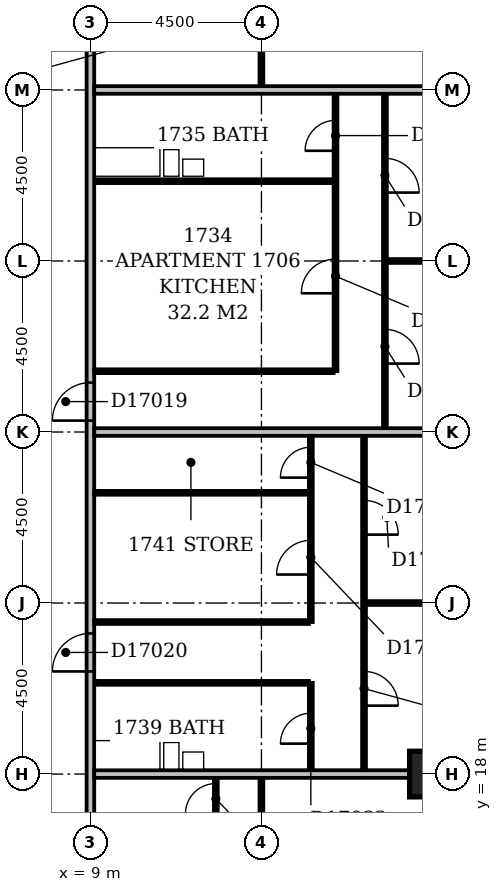
"""IFC4 building model, lengths in metres.
Left out: names, types, materials, properties, quantities, classifications, styles, units other than length and angle.
Written with IfcOpenShell. Run it as: python <this file> out.ifc"""

import sys

from ifc_helpers import new_model, si_unit, direction, frame, frame_2d, origin, origin_2d, place, context, subcontext, project, spatial, rectangle, extrude, element, fill, save


model = new_model("IFC4")
c1 = context("Model", 3, precision=1e-05, world=origin(), true_north=direction((0.0, 1.0)))
c2 = subcontext(c1, "Body", "Model", "MODEL_VIEW")
j1 = project(units=[si_unit("LENGTHUNIT", "METRE"), si_unit("PLANEANGLEUNIT", "RADIAN")], contexts=[c1])
p1 = place(None, origin())
s1 = spatial("IfcSite", under=j1, at=p1, CompositionType="ELEMENT")
p2 = place(p1, origin())
s2 = spatial("IfcBuilding", under=s1, at=p2, CompositionType="ELEMENT")
p3 = place(p2, frame((0.0, 0.0, 72.2)))
s3 = spatial("IfcBuildingStorey", under=s2, at=p3, CompositionType="ELEMENT", Elevation=72.2)
p4 = place(p3, frame((18.0, 18.0, -0.3), z_axis=(0.0, 0.0, 1.0), x_axis=(1.0, 0.0, 0.0)))
e1 = element("IfcColumn", 1, at=p4, inside=s3, PredefinedType="COLUMN", context=c2, shape_type="SweptSolid", body=[
    extrude(rectangle(XDim=1.2, YDim=1.2, at=origin_2d()), origin(), (0.0, 0.0, 1.0), 3.6),
])
p5 = place(p3, frame((9.0, 5.0, 0.0), z_axis=(0.0, 0.0, 1.0), x_axis=(0.0, 1.0, 0.0)))
e2 = element("IfcWall", 2, at=p5, inside=s3, PredefinedType="PARTITIONING", context=c2, shape_type="SweptSolid", body=[
    extrude(rectangle(XDim=44.5, YDim=0.2, at=frame_2d((22.25, 0.0))), origin(), (0.0, 0.0, 1.0), 3.3),
])
p6 = place(p5, frame((22.3, 0.0, 0.0)))
e3 = element("IfcOpeningElement", 3, at=p6, cuts=e2, PredefinedType="OPENING", context=c2, shape_type="SweptSolid", body=[
    extrude(rectangle(XDim=1.0, YDim=2.1, at=frame_2d((0.5, 1.05))), frame((0.0, 0.112, 0.0), z_axis=(0.0, -1.0, 0.0), x_axis=(1.0, 0.0, 0.0)), (0.0, 0.0, 1.0), 0.224),
])
p7 = place(p5, frame((15.7, 0.0, 0.0)))
e4 = element("IfcOpeningElement", 4, at=p7, cuts=e2, PredefinedType="OPENING", context=c2, shape_type="SweptSolid", body=[
    extrude(rectangle(XDim=1.0, YDim=2.1, at=frame_2d((0.5, 1.05))), frame((0.0, 0.112, 0.0), z_axis=(0.0, -1.0, 0.0), x_axis=(1.0, 0.0, 0.0)), (0.0, 0.0, 1.0), 0.224),
])
p8 = place(p5, frame((10.45, 0.0, 0.0)))
e5 = element("IfcOpeningElement", 5, at=p8, cuts=e2, PredefinedType="OPENING", context=c2, shape_type="SweptSolid", body=[
    extrude(rectangle(XDim=1.0, YDim=2.1, at=frame_2d((0.5, 1.05))), frame((0.0, 0.112, 0.0), z_axis=(0.0, -1.0, 0.0), x_axis=(1.0, 0.0, 0.0)), (0.0, 0.0, 1.0), 0.224),
])
p9 = place(p5, frame((5.95, 0.0, 0.0)))
e6 = element("IfcOpeningElement", 6, at=p9, cuts=e2, PredefinedType="OPENING", context=c2, shape_type="SweptSolid", body=[
    extrude(rectangle(XDim=1.0, YDim=2.1, at=frame_2d((0.5, 1.05))), frame((0.0, 0.112, 0.0), z_axis=(0.0, -1.0, 0.0), x_axis=(1.0, 0.0, 0.0)), (0.0, 0.0, 1.0), 0.224),
])
p10 = place(p5, frame((37.25, 0.0, 0.0)))
e7 = element("IfcOpeningElement", 7, at=p10, cuts=e2, PredefinedType="OPENING", context=c2, shape_type="SweptSolid", body=[
    extrude(rectangle(XDim=0.9, YDim=2.1, at=frame_2d((0.45, 1.05))), frame((0.0, 0.112, 0.0), z_axis=(0.0, -1.0, 0.0), x_axis=(1.0, 0.0, 0.0)), (0.0, 0.0, 1.0), 0.224),
])
p11 = place(p5, frame((1.5, 0.0, 0.0)))
e8 = element("IfcOpeningElement", 8, at=p11, cuts=e2, PredefinedType="OPENING", context=c2, shape_type="SweptSolid", body=[
    extrude(rectangle(XDim=0.9, YDim=2.1, at=frame_2d((0.45, 1.05))), frame((0.0, 0.112, 0.0), z_axis=(0.0, -1.0, 0.0), x_axis=(1.0, 0.0, 0.0)), (0.0, 0.0, 1.0), 0.224),
])
p12 = place(p3, frame((13.5, 9.6, 0.0), z_axis=(0.0, 0.0, 1.0), x_axis=(0.0, 1.0, 0.0)))
e9 = element("IfcWall", 9, at=p12, inside=s3, PredefinedType="PARTITIONING", context=c2, shape_type="SweptSolid", body=[
    extrude(rectangle(XDim=8.3, YDim=0.1, at=frame_2d((4.15, 0.0))), origin(), (0.0, 0.0, 1.0), 3.3),
])
p13 = place(p12, frame((5.7, 0.0, 0.0)))
e10 = element("IfcOpeningElement", 10, at=p13, cuts=e9, PredefinedType="OPENING", context=c2, shape_type="SweptSolid", body=[
    extrude(rectangle(XDim=0.9, YDim=2.1, at=frame_2d((0.45, 1.05))), frame((0.0, 0.062, 0.0), z_axis=(0.0, -1.0, 0.0), x_axis=(1.0, 0.0, 0.0)), (0.0, 0.0, 1.0), 0.124),
])
p14 = place(p12, frame((1.2, 0.0, 0.0)))
e11 = element("IfcOpeningElement", 11, at=p14, cuts=e9, PredefinedType="OPENING", context=c2, shape_type="SweptSolid", body=[
    extrude(rectangle(XDim=0.9, YDim=2.1, at=frame_2d((0.45, 1.05))), frame((0.0, 0.062, 0.0), z_axis=(0.0, -1.0, 0.0), x_axis=(1.0, 0.0, 0.0)), (0.0, 0.0, 1.0), 0.124),
])
p15 = place(p3, frame((12.3, 16.7, 0.0), z_axis=(0.0, 0.0, 1.0), x_axis=(0.0, 1.0, 0.0)))
e12 = element("IfcWall", 12, at=p15, inside=s3, PredefinedType="PARTITIONING", context=c2, shape_type="SweptSolid", body=[
    extrude(rectangle(XDim=1.2, YDim=0.1, at=frame_2d((0.6, 0.0))), origin(), (0.0, 0.0, 1.0), 3.3),
])
p16 = place(p15, frame((0.25, 0.0, 0.0)))
e13 = element("IfcOpeningElement", 13, at=p16, cuts=e12, PredefinedType="OPENING", context=c2, shape_type="SweptSolid", body=[
    extrude(rectangle(XDim=0.8, YDim=2.1, at=frame_2d((0.4, 1.05))), frame((0.0, 0.062, 0.0), z_axis=(0.0, -1.0, 0.0), x_axis=(1.0, 0.0, 0.0)), (0.0, 0.0, 1.0), 0.124),
])
p17 = place(p3, frame((9.1, 18.0, 0.0), z_axis=(0.0, 0.0, 1.0), x_axis=(1.0, 0.0, 0.0)))
e14 = element("IfcWall", 14, at=p17, inside=s3, PredefinedType="PARTITIONING", context=c2, shape_type="SweptSolid", body=[
    extrude(rectangle(XDim=8.3, YDim=0.2, at=frame_2d((4.15, 0.0))), origin(), (0.0, 0.0, 1.0), 2.6),
])
p18 = place(p3, frame((14.8, 18.1, 0.0), z_axis=(0.0, 0.0, 1.0), x_axis=(0.0, 1.0, 0.0)))
e15 = element("IfcWall", 15, at=p18, inside=s3, PredefinedType="PARTITIONING", context=c2, shape_type="SweptSolid", body=[
    extrude(rectangle(XDim=2.3, YDim=0.1, at=frame_2d((1.15, 0.0))), origin(), (0.0, 0.0, 1.0), 3.3),
])
p19 = place(p18, frame((0.7, 0.0, 0.0)))
e16 = element("IfcOpeningElement", 16, at=p19, cuts=e15, PredefinedType="OPENING", context=c2, shape_type="SweptSolid", body=[
    extrude(rectangle(XDim=0.8, YDim=2.1, at=frame_2d((0.4, 1.05))), frame((0.0, 0.062, 0.0), z_axis=(0.0, -1.0, 0.0), x_axis=(1.0, 0.0, 0.0)), (0.0, 0.0, 1.0), 0.124),
])
p20 = place(p3, frame((16.2, 18.1, 0.0), z_axis=(0.0, 0.0, 1.0), x_axis=(0.0, 1.0, 0.0)))
e17 = element("IfcWall", 17, at=p20, inside=s3, PredefinedType="PARTITIONING", context=c2, shape_type="SweptSolid", body=[
    extrude(rectangle(XDim=8.8, YDim=0.1, at=frame_2d((4.4, 0.0))), origin(), (0.0, 0.0, 1.0), 3.3),
])
p21 = place(p20, frame((1.7, 0.0, 0.0)))
e18 = element("IfcOpeningElement", 18, at=p21, cuts=e17, PredefinedType="OPENING", context=c2, shape_type="SweptSolid", body=[
    extrude(rectangle(XDim=0.9, YDim=2.1, at=frame_2d((0.45, 1.05))), frame((0.0, 0.062, 0.0), z_axis=(0.0, -1.0, 0.0), x_axis=(1.0, 0.0, 0.0)), (0.0, 0.0, 1.0), 0.124),
])
p22 = place(p20, frame((6.2, 0.0, 0.0)))
e19 = element("IfcOpeningElement", 19, at=p22, cuts=e17, PredefinedType="OPENING", context=c2, shape_type="SweptSolid", body=[
    extrude(rectangle(XDim=0.9, YDim=2.1, at=frame_2d((0.45, 1.05))), frame((0.0, 0.062, 0.0), z_axis=(0.0, -1.0, 0.0), x_axis=(1.0, 0.0, 0.0)), (0.0, 0.0, 1.0), 0.124),
])
p23 = place(p3, frame((9.1, 20.4, 0.0), z_axis=(0.0, 0.0, 1.0), x_axis=(1.0, 0.0, 0.0)))
e20 = element("IfcWall", 20, at=p23, inside=s3, PredefinedType="PLUMBINGWALL", context=c2, shape_type="SweptSolid", body=[
    extrude(rectangle(XDim=5.65, YDim=0.1, at=frame_2d((2.825, 0.0))), origin(), (0.0, 0.0, 1.0), 3.3),
])
p24 = place(p3, frame((9.1, 22.0, 0.0), z_axis=(0.0, 0.0, 1.0), x_axis=(1.0, 0.0, 0.0)))
e21 = element("IfcWall", 21, at=p24, inside=s3, PredefinedType="PARTITIONING", context=c2, shape_type="SweptSolid", body=[
    extrude(rectangle(XDim=5.65, YDim=0.1, at=frame_2d((2.825, 0.0))), origin(), (0.0, 0.0, 1.0), 3.3),
])
p25 = place(p3, frame((14.8, 22.0, 0.0), z_axis=(0.0, 0.0, 1.0), x_axis=(0.0, 1.0, 0.0)))
e22 = element("IfcWall", 22, at=p25, inside=s3, PredefinedType="PARTITIONING", context=c2, shape_type="SweptSolid", body=[
    extrude(rectangle(XDim=4.9, YDim=0.1, at=frame_2d((2.45, 0.0))), origin(), (0.0, 0.0, 1.0), 3.3),
])
p26 = place(p25, frame((1.25, 0.0, 0.0)))
e23 = element("IfcOpeningElement", 23, at=p26, cuts=e22, PredefinedType="OPENING", context=c2, shape_type="SweptSolid", body=[
    extrude(rectangle(XDim=0.9, YDim=2.1, at=frame_2d((0.45, 1.05))), frame((0.0, 0.062, 0.0), z_axis=(0.0, -1.0, 0.0), x_axis=(1.0, 0.0, 0.0)), (0.0, 0.0, 1.0), 0.124),
])
p27 = place(p25, frame((3.8, 0.0, 0.0)))
e24 = element("IfcOpeningElement", 24, at=p27, cuts=e22, PredefinedType="OPENING", context=c2, shape_type="SweptSolid", body=[
    extrude(rectangle(XDim=0.8, YDim=2.1, at=frame_2d((0.4, 1.05))), frame((0.0, 0.062, 0.0), z_axis=(0.0, -1.0, 0.0), x_axis=(1.0, 0.0, 0.0)), (0.0, 0.0, 1.0), 0.124),
])
for number, where, z_axis, x_axis in (
    (25, (16.25, 22.5, 0.0), (0.0, 0.0, 1.0), (1.0, 0.0, 0.0)),
    (26, (9.1, 25.4, 0.0), (0.0, 0.0, 1.0), (1.0, 0.0, 0.0)),
):
    element("IfcWall", number, at=place(p3, frame(where, z_axis=z_axis, x_axis=x_axis)), inside=s3, PredefinedType="PARTITIONING", context=c2, shape_type="SweptSolid", body=[
        extrude(rectangle(XDim=5.65, YDim=0.1, at=frame_2d((2.825, 0.0))), origin(), (0.0, 0.0, 1.0), 3.3),
    ])
p28 = place(p3, frame((9.1, 27.0, 0.0), z_axis=(0.0, 0.0, 1.0), x_axis=(1.0, 0.0, 0.0)))
e27 = element("IfcWall", 27, at=p28, inside=s3, PredefinedType="PARTITIONING", context=c2, shape_type="SweptSolid", body=[
    extrude(rectangle(XDim=12.8, YDim=0.2, at=frame_2d((6.4, 0.0))), origin(), (0.0, 0.0, 1.0), 2.7),
])
p29 = place(p3, frame((16.75, 27.1, 0.0), z_axis=(0.0, 0.0, 1.0), x_axis=(0.0, 1.0, 0.0)))
e28 = element("IfcWall", 28, at=p29, inside=s3, PredefinedType="PARTITIONING", context=c2, shape_type="SweptSolid", body=[
    extrude(rectangle(XDim=8.8, YDim=0.1, at=frame_2d((4.4, 0.0))), origin(), (0.0, 0.0, 1.0), 3.3),
])
p30 = place(p29, frame((1.7, 0.0, 0.0)))
e29 = element("IfcOpeningElement", 29, at=p30, cuts=e28, PredefinedType="OPENING", context=c2, shape_type="SweptSolid", body=[
    extrude(rectangle(XDim=0.9, YDim=2.1, at=frame_2d((0.45, 1.05))), frame((0.0, 0.062, 0.0), z_axis=(0.0, -1.0, 0.0), x_axis=(1.0, 0.0, 0.0)), (0.0, 0.0, 1.0), 0.124),
])
p31 = place(p29, frame((6.2, 0.0, 0.0)))
e30 = element("IfcOpeningElement", 30, at=p31, cuts=e28, PredefinedType="OPENING", context=c2, shape_type="SweptSolid", body=[
    extrude(rectangle(XDim=0.9, YDim=2.1, at=frame_2d((0.45, 1.05))), frame((0.0, 0.062, 0.0), z_axis=(0.0, -1.0, 0.0), x_axis=(1.0, 0.0, 0.0)), (0.0, 0.0, 1.0), 0.124),
])
p32 = place(p3, frame((9.1, 28.6, 0.0), z_axis=(0.0, 0.0, 1.0), x_axis=(1.0, 0.0, 0.0)))
e31 = element("IfcWall", 31, at=p32, inside=s3, PredefinedType="PARTITIONING", context=c2, shape_type="SweptSolid", body=[
    extrude(rectangle(XDim=6.3, YDim=0.1, at=frame_2d((3.15, 0.0))), origin(), (0.0, 0.0, 1.0), 3.3),
])
p33 = place(p3, frame((15.45, 28.6, 0.0), z_axis=(0.0, 0.0, 1.0), x_axis=(0.0, 1.0, 0.0)))
e32 = element("IfcWall", 32, at=p33, inside=s3, PredefinedType="PARTITIONING", context=c2, shape_type="SweptSolid", body=[
    extrude(rectangle(XDim=7.3, YDim=0.1, at=frame_2d((3.65, 0.0))), origin(), (0.0, 0.0, 1.0), 3.3),
])
p34 = place(p33, frame((5.8, 0.0, 0.0)))
e33 = element("IfcOpeningElement", 33, at=p34, cuts=e32, PredefinedType="OPENING", context=c2, shape_type="SweptSolid", body=[
    extrude(rectangle(XDim=0.8, YDim=2.1, at=frame_2d((0.4, 1.05))), frame((0.0, 0.062, 0.0), z_axis=(0.0, -1.0, 0.0), x_axis=(1.0, 0.0, 0.0)), (0.0, 0.0, 1.0), 0.124),
])
p35 = place(p33, frame((2.05, 0.0, 0.0)))
e34 = element("IfcOpeningElement", 34, at=p35, cuts=e32, PredefinedType="OPENING", context=c2, shape_type="SweptSolid", body=[
    extrude(rectangle(XDim=0.9, YDim=2.1, at=frame_2d((0.45, 1.05))), frame((0.0, 0.062, 0.0), z_axis=(0.0, -1.0, 0.0), x_axis=(1.0, 0.0, 0.0)), (0.0, 0.0, 1.0), 0.124),
])
p36 = place(p3, frame((16.8, 31.5, 0.0), z_axis=(0.0, 0.0, 1.0), x_axis=(1.0, 0.0, 0.0)))
e35 = element("IfcWall", 35, at=p36, inside=s3, PredefinedType="PARTITIONING", context=c2, shape_type="SweptSolid", body=[
    extrude(rectangle(XDim=5.1, YDim=0.1, at=frame_2d((2.55, 0.0))), origin(), (0.0, 0.0, 1.0), 3.3),
])
p37 = place(p3, frame((9.1, 33.6, 0.0), z_axis=(0.0, 0.0, 1.0), x_axis=(1.0, 0.0, 0.0)))
e36 = element("IfcWall", 36, at=p37, inside=s3, PredefinedType="PLUMBINGWALL", context=c2, shape_type="SweptSolid", body=[
    extrude(rectangle(XDim=6.3, YDim=0.1, at=frame_2d((3.15, 0.0))), origin(), (0.0, 0.0, 1.0), 3.3),
])
p38 = place(p3, frame((9.1, 36.0, 0.0), z_axis=(0.0, 0.0, 1.0), x_axis=(1.0, 0.0, 0.0)))
e37 = element("IfcWall", 37, at=p38, inside=s3, PredefinedType="PARTITIONING", context=c2, shape_type="SweptSolid", body=[
    extrude(rectangle(XDim=12.8, YDim=0.2, at=frame_2d((6.4, 0.0))), origin(), (0.0, 0.0, 1.0), 2.4),
])
p39 = place(p3, frame((13.5, 36.1, 0.0), z_axis=(0.0, 0.0, 1.0), x_axis=(0.0, 1.0, 0.0)))
e38 = element("IfcWall", 38, at=p39, inside=s3, PredefinedType="PARTITIONING", context=c2, shape_type="SweptSolid", body=[
    extrude(rectangle(XDim=13.3, YDim=0.1, at=frame_2d((6.65, 0.0))), origin(), (0.0, 0.0, 1.0), 3.3),
])
p40 = place(p6, origin())
e39 = element("IfcDoor", 39, at=p40, inside=s3, OperationType="SINGLE_SWING_LEFT", PredefinedType="DOOR", context=c2, shape_type="SweptSolid", body=[
    extrude(rectangle(XDim=1.0, YDim=2.1, at=frame_2d((0.5, 1.05))), frame((0.0, 0.025, 0.0), z_axis=(0.0, -1.0, 0.0), x_axis=(1.0, 0.0, 0.0)), (0.0, 0.0, 1.0), 0.05),
])
fill(e3, e39)
p41 = place(p7, origin())
e40 = element("IfcDoor", 40, at=p41, inside=s3, OperationType="SINGLE_SWING_LEFT", PredefinedType="DOOR", context=c2, shape_type="SweptSolid", body=[
    extrude(rectangle(XDim=1.0, YDim=2.1, at=frame_2d((0.5, 1.05))), frame((0.0, 0.025, 0.0), z_axis=(0.0, -1.0, 0.0), x_axis=(1.0, 0.0, 0.0)), (0.0, 0.0, 1.0), 0.05),
])
fill(e4, e40)
p42 = place(p16, origin())
e41 = element("IfcDoor", 41, at=p42, inside=s3, OperationType="SINGLE_SWING_LEFT", PredefinedType="DOOR", context=c2, shape_type="SweptSolid", body=[
    extrude(rectangle(XDim=0.8, YDim=2.1, at=frame_2d((0.4, 1.05))), frame((0.0, 0.025, 0.0), z_axis=(0.0, -1.0, 0.0), x_axis=(1.0, 0.0, 0.0)), (0.0, 0.0, 1.0), 0.05),
])
fill(e13, e41)
p43 = place(p19, origin())
e42 = element("IfcDoor", 42, at=p43, inside=s3, OperationType="SINGLE_SWING_LEFT", PredefinedType="DOOR", context=c2, shape_type="SweptSolid", body=[
    extrude(rectangle(XDim=0.8, YDim=2.1, at=frame_2d((0.4, 1.05))), frame((0.0, 0.025, 0.0), z_axis=(0.0, -1.0, 0.0), x_axis=(1.0, 0.0, 0.0)), (0.0, 0.0, 1.0), 0.05),
])
fill(e16, e42)
p44 = place(p21, frame((0.9, 0.0, 0.0), z_axis=(0.0, 0.0, 1.0), x_axis=(-1.0, 0.0, 0.0)))
e43 = element("IfcDoor", 43, at=p44, inside=s3, OperationType="SINGLE_SWING_RIGHT", PredefinedType="DOOR", context=c2, shape_type="SweptSolid", body=[
    extrude(rectangle(XDim=0.9, YDim=2.1, at=frame_2d((0.45, 1.05))), frame((0.0, 0.025, 0.0), z_axis=(0.0, -1.0, 0.0), x_axis=(1.0, 0.0, 0.0)), (0.0, 0.0, 1.0), 0.05),
])
fill(e18, e43)
p45 = place(p22, frame((0.9, 0.0, 0.0), z_axis=(0.0, 0.0, 1.0), x_axis=(-1.0, 0.0, 0.0)))
e44 = element("IfcDoor", 44, at=p45, inside=s3, OperationType="SINGLE_SWING_RIGHT", PredefinedType="DOOR", context=c2, shape_type="SweptSolid", body=[
    extrude(rectangle(XDim=0.9, YDim=2.1, at=frame_2d((0.45, 1.05))), frame((0.0, 0.025, 0.0), z_axis=(0.0, -1.0, 0.0), x_axis=(1.0, 0.0, 0.0)), (0.0, 0.0, 1.0), 0.05),
])
fill(e19, e44)
p46 = place(p26, origin())
e45 = element("IfcDoor", 45, at=p46, inside=s3, OperationType="SINGLE_SWING_LEFT", PredefinedType="DOOR", context=c2, shape_type="SweptSolid", body=[
    extrude(rectangle(XDim=0.9, YDim=2.1, at=frame_2d((0.45, 1.05))), frame((0.0, 0.025, 0.0), z_axis=(0.0, -1.0, 0.0), x_axis=(1.0, 0.0, 0.0)), (0.0, 0.0, 1.0), 0.05),
])
fill(e23, e45)
p47 = place(p27, origin())
e46 = element("IfcDoor", 46, at=p47, inside=s3, OperationType="SINGLE_SWING_LEFT", PredefinedType="DOOR", context=c2, shape_type="SweptSolid", body=[
    extrude(rectangle(XDim=0.8, YDim=2.1, at=frame_2d((0.4, 1.05))), frame((0.0, 0.025, 0.0), z_axis=(0.0, -1.0, 0.0), x_axis=(1.0, 0.0, 0.0)), (0.0, 0.0, 1.0), 0.05),
])
fill(e24, e46)
p48 = place(p30, frame((0.9, 0.0, 0.0), z_axis=(0.0, 0.0, 1.0), x_axis=(-1.0, 0.0, 0.0)))
e47 = element("IfcDoor", 47, at=p48, inside=s3, OperationType="SINGLE_SWING_RIGHT", PredefinedType="DOOR", context=c2, shape_type="SweptSolid", body=[
    extrude(rectangle(XDim=0.9, YDim=2.1, at=frame_2d((0.45, 1.05))), frame((0.0, 0.025, 0.0), z_axis=(0.0, -1.0, 0.0), x_axis=(1.0, 0.0, 0.0)), (0.0, 0.0, 1.0), 0.05),
])
fill(e29, e47)
p49 = place(p31, frame((0.9, 0.0, 0.0), z_axis=(0.0, 0.0, 1.0), x_axis=(-1.0, 0.0, 0.0)))
e48 = element("IfcDoor", 48, at=p49, inside=s3, OperationType="SINGLE_SWING_RIGHT", PredefinedType="DOOR", context=c2, shape_type="SweptSolid", body=[
    extrude(rectangle(XDim=0.9, YDim=2.1, at=frame_2d((0.45, 1.05))), frame((0.0, 0.025, 0.0), z_axis=(0.0, -1.0, 0.0), x_axis=(1.0, 0.0, 0.0)), (0.0, 0.0, 1.0), 0.05),
])
fill(e30, e48)
p50 = place(p34, origin())
e49 = element("IfcDoor", 49, at=p50, inside=s3, OperationType="SINGLE_SWING_LEFT", PredefinedType="DOOR", context=c2, shape_type="SweptSolid", body=[
    extrude(rectangle(XDim=0.8, YDim=2.1, at=frame_2d((0.4, 1.05))), frame((0.0, 0.025, 0.0), z_axis=(0.0, -1.0, 0.0), x_axis=(1.0, 0.0, 0.0)), (0.0, 0.0, 1.0), 0.05),
])
fill(e33, e49)
p51 = place(p35, origin())
e50 = element("IfcDoor", 50, at=p51, inside=s3, OperationType="SINGLE_SWING_LEFT", PredefinedType="DOOR", context=c2, shape_type="SweptSolid", body=[
    extrude(rectangle(XDim=0.9, YDim=2.1, at=frame_2d((0.45, 1.05))), frame((0.0, 0.025, 0.0), z_axis=(0.0, -1.0, 0.0), x_axis=(1.0, 0.0, 0.0)), (0.0, 0.0, 1.0), 0.05),
])
fill(e34, e50)
save(model, sys.argv[1])
